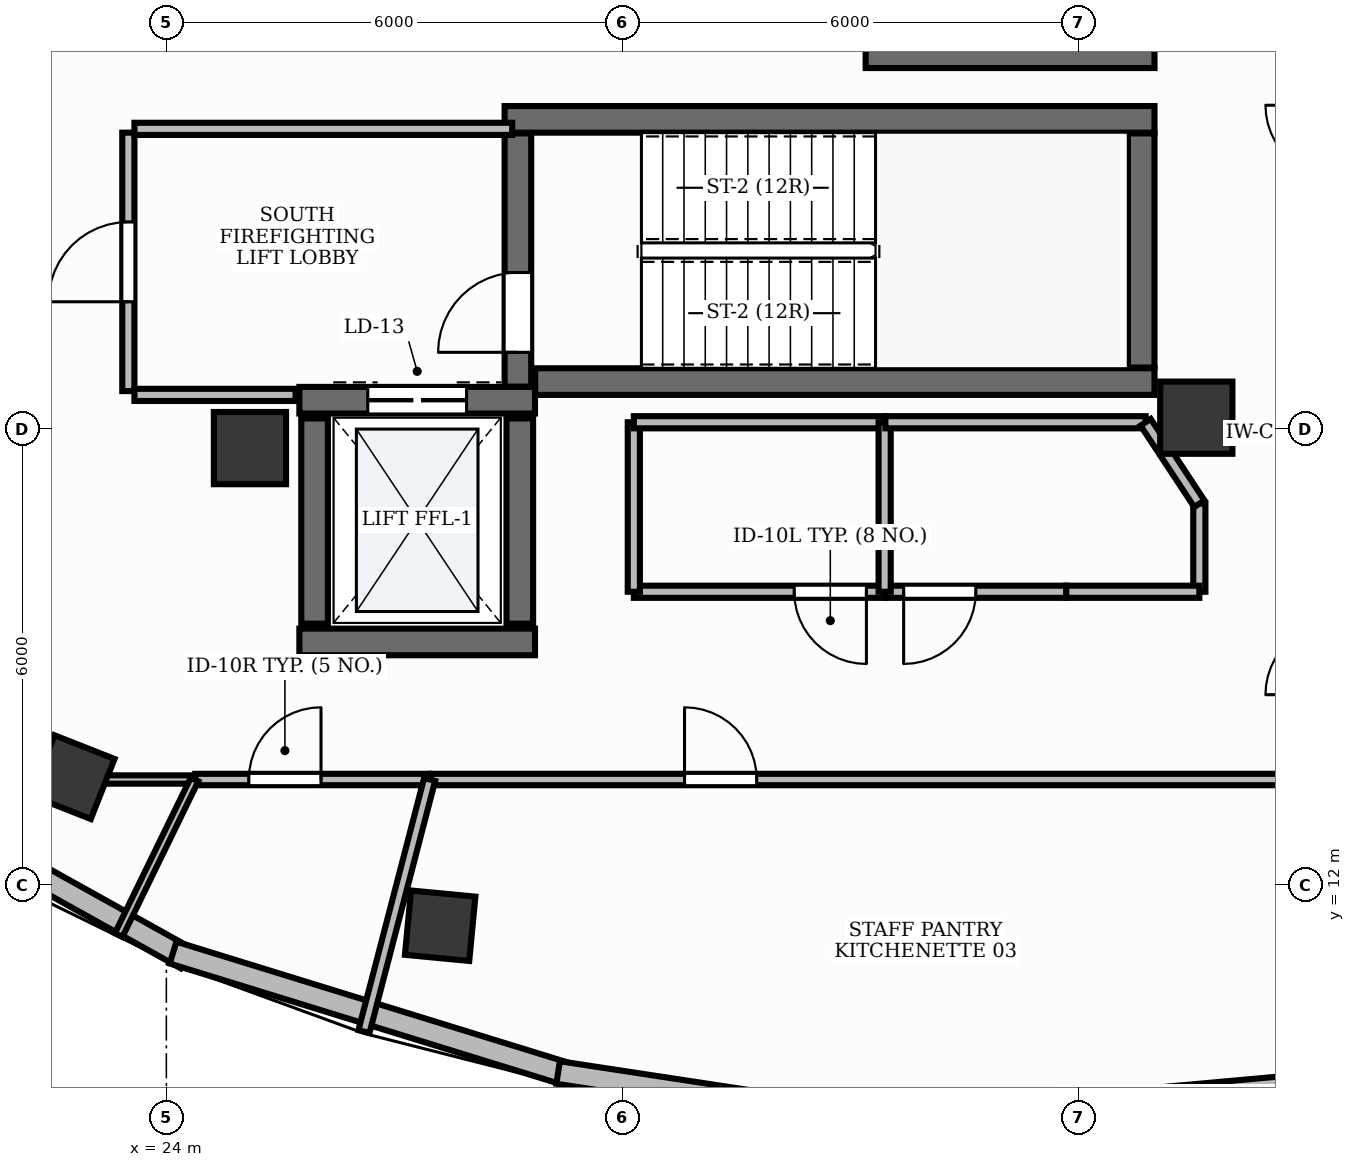
"""IFC4 building model, lengths in metres.
Left out: names, types, materials, properties, quantities, classifications, styles, units other than length and angle.
Written with IfcOpenShell. Run it as: python <this file> out.ifc"""

import sys

from ifc_helpers import new_model, si_unit, direction, frame, frame_2d, origin, origin_2d, place, context, subcontext, project, spatial, rectangle, extrude, element, fill, save


model = new_model("IFC4")
c1 = context("Model", 3, precision=1e-05, world=origin(), true_north=direction((0.0, 1.0)))
c2 = subcontext(c1, "Body", "Model", "MODEL_VIEW")
j1 = project(units=[si_unit("LENGTHUNIT", "METRE"), si_unit("PLANEANGLEUNIT", "RADIAN")], contexts=[c1])
p1 = place(None, origin())
s1 = spatial("IfcSite", under=j1, at=p1, CompositionType="ELEMENT")
p2 = place(p1, origin())
s2 = spatial("IfcBuilding", under=s1, at=p2, CompositionType="ELEMENT")
p3 = place(p2, frame((0.0, 0.0, 306.0)))
s3 = spatial("IfcBuildingStorey", under=s2, at=p3, CompositionType="ELEMENT", Elevation=306.0)
p4 = place(p3, frame((28.852, 18.625, 0.0), z_axis=(0.0, 0.0, 1.0), x_axis=(1.0, 0.0, 0.0)))
e1 = element("IfcWall", 1, at=p4, inside=s3, PredefinedType="SHEAR", context=c2, shape_type="SweptSolid", body=[
    extrude(rectangle(XDim=8.148, YDim=0.35, at=frame_2d((4.074, 0.0))), origin(), (0.0, 0.0, 1.0), 3.9),
])
p5 = place(p3, frame((28.45, 22.075, 0.0), z_axis=(0.0, 0.0, 1.0), x_axis=(1.0, 0.0, 0.0)))
e2 = element("IfcWall", 2, at=p5, inside=s3, PredefinedType="SHEAR", context=c2, shape_type="SweptSolid", body=[
    extrude(rectangle(XDim=8.55, YDim=0.35, at=frame_2d((4.275, 0.0))), origin(), (0.0, 0.0, 1.0), 3.9),
])
p6 = place(p3, frame((36.825, 18.81, 0.0), z_axis=(0.0, 0.0, 1.0), x_axis=(0.0, 1.0, 0.0)))
e3 = element("IfcWall", 3, at=p6, inside=s3, PredefinedType="SHEAR", context=c2, shape_type="SweptSolid", body=[
    extrude(rectangle(XDim=3.08, YDim=0.35, at=frame_2d((1.54, 0.0))), origin(), (0.0, 0.0, 1.0), 3.9),
])
p7 = place(p3, frame((28.625, 18.557, 0.0), z_axis=(0.0, 0.0, 1.0), x_axis=(0.0, 1.0, 0.0)))
e4 = element("IfcWall", 4, at=p7, inside=s3, PredefinedType="SHEAR", context=c2, shape_type="SweptSolid", body=[
    extrude(rectangle(XDim=3.333, YDim=0.35, at=frame_2d((1.667, 0.0))), origin(), (0.0, 0.0, 1.0), 3.9),
])
p8 = place(p7, frame((0.453, 0.0, 0.0)))
e5 = element("IfcOpeningElement", 5, at=p8, cuts=e4, PredefinedType="OPENING", context=c2, shape_type="SweptSolid", body=[
    extrude(rectangle(XDim=1.05, YDim=2.15, at=frame_2d((0.525, 1.075))), frame((0.0, 0.19, 0.0), z_axis=(0.0, -1.0, 0.0), x_axis=(1.0, 0.0, 0.0)), (0.0, 0.0, 1.0), 0.38),
])
p9 = place(p3, frame((33.2, 22.925, 0.0), z_axis=(0.0, 0.0, 1.0), x_axis=(1.0, 0.0, 0.0)))
e6 = element("IfcWall", 6, at=p9, inside=s3, PredefinedType="SHEAR", context=c2, shape_type="SweptSolid", body=[
    extrude(rectangle(XDim=3.8, YDim=0.35, at=frame_2d((1.9, 0.0))), origin(), (0.0, 0.0, 1.0), 3.9),
])
p10 = place(p3, frame((25.75, 15.2, 0.0), z_axis=(0.0, 0.0, 1.0), x_axis=(1.0, 0.0, 0.0)))
e7 = element("IfcWall", 7, at=p10, inside=s3, PredefinedType="SHEAR", context=c2, shape_type="SweptSolid", body=[
    extrude(rectangle(XDim=3.1, YDim=0.35, at=frame_2d((1.55, 0.0))), origin(), (0.0, 0.0, 1.0), 3.9),
])
p11 = place(p3, frame((25.75, 18.38, 0.0), z_axis=(0.0, 0.0, 1.0), x_axis=(1.0, 0.0, 0.0)))
e8 = element("IfcWall", 8, at=p11, inside=s3, PredefinedType="SHEAR", context=c2, shape_type="SweptSolid", body=[
    extrude(rectangle(XDim=3.1, YDim=0.35, at=frame_2d((1.55, 0.0))), origin(), (0.0, 0.0, 1.0), 3.9),
])
p12 = place(p11, frame((0.9, 0.0, 0.0)))
e9 = element("IfcOpeningElement", 9, at=p12, cuts=e8, PredefinedType="OPENING", context=c2, shape_type="SweptSolid", body=[
    extrude(rectangle(XDim=1.3, YDim=2.2, at=frame_2d((0.65, 1.1))), frame((0.0, 0.19, 0.0), z_axis=(0.0, -1.0, 0.0), x_axis=(1.0, 0.0, 0.0)), (0.0, 0.0, 1.0), 0.38),
])
for number, where, z_axis, x_axis in (
    (10, (25.95, 15.44, 0.0), (0.0, 0.0, 1.0), (0.0, 1.0, 0.0)),
    (11, (28.65, 15.44, 0.0), (0.0, 0.0, 1.0), (0.0, 1.0, 0.0)),
):
    element("IfcWall", number, at=place(p3, frame(where, z_axis=z_axis, x_axis=x_axis)), inside=s3, PredefinedType="SHEAR", context=c2, shape_type="SweptSolid", body=[
        extrude(rectangle(XDim=2.7, YDim=0.35, at=frame_2d((1.35, 0.0))), origin(), (0.0, 0.0, 1.0), 3.9),
    ])
for number, where, z_axis, x_axis in (
    (12, (25.1, 17.75, -0.0), (0.0, 0.0, 1.0), (1.0, 0.0, 0.0)),
    (13, (37.55, 18.15, -0.0), (0.0, 0.0, 1.0), (1.0, 0.0, 0.0)),
):
    element("IfcColumn", number, at=place(p3, frame(where, z_axis=z_axis, x_axis=x_axis)), inside=s3, PredefinedType="PILASTER", context=c2, shape_type="SweptSolid", body=[
        extrude(rectangle(XDim=0.95, YDim=0.95, at=origin_2d()), origin(), (0.0, 0.0, 1.0), 3.901),
    ])
for number, where, z_axis, x_axis in (
    (14, (22.766, 13.421, -0.0), (0.0, 0.0, 1.0), (-0.93, 0.367, 0.0)),
    (15, (27.602, 11.466, -0.0), (0.0, 0.0, 1.0), (-0.995, 0.095, 0.0)),
):
    element("IfcColumn", number, at=place(p3, frame(where, z_axis=z_axis, x_axis=x_axis)), inside=s3, PredefinedType="COLUMN", context=c2, shape_type="SweptSolid", body=[
        extrude(rectangle(XDim=0.85, YDim=0.85, at=origin_2d()), origin(), (0.0, 0.0, 1.0), 3.901),
    ])
p13 = place(p3, frame((19.648, 13.61, 0.0), z_axis=(0.0, 0.0, 1.0), x_axis=(0.87350676692, -0.486812004932, 0.0)))
e16 = element("IfcWall", 16, at=p13, inside=s3, PredefinedType="STANDARD", context=c2, shape_type="SweptSolid", body=[
    extrude(rectangle(XDim=5.282, YDim=0.3, at=frame_2d((2.641, 0.0))), origin(), (0.0, 0.0, 1.0), 3.9),
])
p14 = place(p3, frame((24.088, 11.113, 0.0), z_axis=(0.0, 0.0, 1.0), x_axis=(0.955535200816, -0.29487705913, 0.0)))
e17 = element("IfcWall", 17, at=p14, inside=s3, PredefinedType="STANDARD", context=c2, shape_type="SweptSolid", body=[
    extrude(rectangle(XDim=5.485, YDim=0.3, at=frame_2d((2.743, 0.0))), origin(), (0.0, 0.0, 1.0), 3.9),
])
p15 = place(p3, frame((29.154, 9.535, 0.0), z_axis=(0.0, 0.0, 1.0), x_axis=(0.988626523862, -0.150391476873, 0.0)))
e18 = element("IfcWall", 18, at=p15, inside=s3, PredefinedType="STANDARD", context=c2, shape_type="SweptSolid", body=[
    extrude(rectangle(XDim=2.875, YDim=0.3, at=frame_2d((1.438, 0.0))), origin(), (0.0, 0.0, 1.0), 3.9),
])
p16 = place(p3, frame((34.529, 8.961, 0.0), z_axis=(0.0, 0.0, 1.0), x_axis=(0.995950163058, 0.089907022552, 0.0)))
e19 = element("IfcWall", 19, at=p16, inside=s3, PredefinedType="STANDARD", context=c2, shape_type="SweptSolid", body=[
    extrude(rectangle(XDim=5.602, YDim=0.3, at=frame_2d((2.801, 0.0))), origin(), (0.0, 0.0, 1.0), 3.9),
])
p17 = place(p3, frame((23.5, 18.5, 0.0), z_axis=(0.0, 0.0, 1.0), x_axis=(0.0, 1.0, 0.0)))
e20 = element("IfcWall", 20, at=p17, inside=s3, PredefinedType="PARTITIONING", context=c2, shape_type="SweptSolid", body=[
    extrude(rectangle(XDim=3.4, YDim=0.16, at=frame_2d((1.7, 0.0))), origin(), (0.0, 0.0, 1.0), 2.91),
])
p18 = place(p17, frame((1.175, 0.0, 0.0)))
e21 = element("IfcOpeningElement", 21, at=p18, cuts=e20, PredefinedType="OPENING", context=c2, shape_type="SweptSolid", body=[
    extrude(rectangle(XDim=1.05, YDim=2.15, at=frame_2d((0.525, 1.075))), frame((0.0, 0.095, 0.0), z_axis=(0.0, -1.0, 0.0), x_axis=(1.0, 0.0, 0.0)), (0.0, 0.0, 1.0), 0.19),
])
p19 = place(p3, frame((23.58, 21.95, 0.0), z_axis=(0.0, 0.0, 1.0), x_axis=(1.0, 0.0, 0.0)))
e22 = element("IfcWall", 22, at=p19, inside=s3, PredefinedType="PARTITIONING", context=c2, shape_type="SweptSolid", body=[
    extrude(rectangle(XDim=4.97, YDim=0.16, at=frame_2d((2.485, 0.0))), origin(), (0.0, 0.0, 1.0), 2.91),
])
p20 = place(p3, frame((23.58, 18.45, 0.0), z_axis=(0.0, 0.0, 1.0), x_axis=(1.0, 0.0, 0.0)))
e23 = element("IfcWall", 23, at=p20, inside=s3, PredefinedType="PARTITIONING", context=c2, shape_type="SweptSolid", body=[
    extrude(rectangle(XDim=2.12, YDim=0.16, at=frame_2d((1.06, 0.0))), origin(), (0.0, 0.0, 1.0), 2.91),
])
p21 = place(p3, frame((33.45, 15.86, 0.0), z_axis=(0.0, 0.0, 1.0), x_axis=(-1.0, 0.0, 0.0)))
e24 = element("IfcWall", 24, at=p21, inside=s3, PredefinedType="PARTITIONING", context=c2, shape_type="SweptSolid", body=[
    extrude(rectangle(XDim=3.3, YDim=0.16, at=frame_2d((1.65, 0.0))), origin(), (0.0, 0.0, 1.0), 2.91),
])
p22 = place(p21, frame((0.24, 0.0, 0.0)))
e25 = element("IfcOpeningElement", 25, at=p22, cuts=e24, PredefinedType="OPENING", context=c2, shape_type="SweptSolid", body=[
    extrude(rectangle(XDim=0.95, YDim=2.15, at=frame_2d((0.475, 1.075))), frame((0.0, 0.095, 0.0), z_axis=(0.0, -1.0, 0.0), x_axis=(1.0, 0.0, 0.0)), (0.0, 0.0, 1.0), 0.19),
])
p23 = place(p3, frame((24.381, 13.39, 0.0), z_axis=(0.0, 0.0, 1.0), x_axis=(1.0, 0.0, 0.0)))
e26 = element("IfcWall", 26, at=p23, inside=s3, PredefinedType="PARTITIONING", context=c2, shape_type="SweptSolid", body=[
    extrude(rectangle(XDim=3.083, YDim=0.15, at=frame_2d((1.542, 0.0))), origin(), (0.0, 0.0, 1.0), 2.91),
])
p24 = place(p23, frame((0.704, 0.0, 0.0)))
e27 = element("IfcOpeningElement", 27, at=p24, cuts=e26, PredefinedType="OPENING", context=c2, shape_type="SweptSolid", body=[
    extrude(rectangle(XDim=0.95, YDim=2.15, at=frame_2d((0.475, 1.075))), frame((0.0, 0.09, 0.0), z_axis=(0.0, -1.0, 0.0), x_axis=(1.0, 0.0, 0.0)), (0.0, 0.0, 1.0), 0.18),
])
p25 = place(p3, frame((27.474, 13.39, 0.0), z_axis=(0.0, 0.0, 1.0), x_axis=(1.0, 0.0, 0.0)))
e28 = element("IfcWall", 28, at=p25, inside=s3, PredefinedType="PARTITIONING", context=c2, shape_type="SweptSolid", body=[
    extrude(rectangle(XDim=11.926, YDim=0.15, at=frame_2d((5.963, 0.0))), origin(), (0.0, 0.0, 1.0), 2.91),
])
p26 = place(p25, frame((3.344, 0.0, 0.0)))
e29 = element("IfcOpeningElement", 29, at=p26, cuts=e28, PredefinedType="OPENING", context=c2, shape_type="SweptSolid", body=[
    extrude(rectangle(XDim=0.95, YDim=2.15, at=frame_2d((0.475, 1.075))), frame((0.0, 0.09, 0.0), z_axis=(0.0, -1.0, 0.0), x_axis=(1.0, 0.0, 0.0)), (0.0, 0.0, 1.0), 0.18),
])
p27 = place(p3, frame((35.84, 15.86, 0.0), z_axis=(0.0, 0.0, 1.0), x_axis=(-1.0, 0.0, 0.0)))
e30 = element("IfcWall", 30, at=p27, inside=s3, PredefinedType="PARTITIONING", context=c2, shape_type="SweptSolid", body=[
    extrude(rectangle(XDim=2.38, YDim=0.16, at=frame_2d((1.19, 0.0))), origin(), (0.0, 0.0, 1.0), 2.91),
])
p28 = place(p27, frame((1.19, 0.0, 0.0)))
e31 = element("IfcOpeningElement", 31, at=p28, cuts=e30, PredefinedType="OPENING", context=c2, shape_type="SweptSolid", body=[
    extrude(rectangle(XDim=0.95, YDim=2.15, at=frame_2d((0.475, 1.075))), frame((0.0, 0.095, 0.0), z_axis=(0.0, -1.0, 0.0), x_axis=(1.0, 0.0, 0.0)), (0.0, 0.0, 1.0), 0.19),
])
p29 = place(p3, frame((30.15, 15.86, 0.0), z_axis=(0.0, 0.0, 1.0), x_axis=(0.0, 1.0, 0.0)))
e32 = element("IfcWall", 32, at=p29, inside=s3, PredefinedType="PARTITIONING", context=c2, shape_type="SweptSolid", body=[
    extrude(rectangle(XDim=2.23, YDim=0.16, at=frame_2d((1.115, 0.0))), origin(), (0.0, 0.0, 1.0), 2.91),
])
p30 = place(p3, frame((30.15, 18.09, 0.0), z_axis=(0.0, 0.0, 1.0), x_axis=(1.0, 0.0, 0.0)))
e33 = element("IfcWall", 33, at=p30, inside=s3, PredefinedType="PARTITIONING", context=c2, shape_type="SweptSolid", body=[
    extrude(rectangle(XDim=3.3, YDim=0.16, at=frame_2d((1.65, 0.0))), origin(), (0.0, 0.0, 1.0), 2.91),
])
p31 = place(p3, frame((33.45, 18.09, 0.0), z_axis=(0.0, 0.0, 1.0), x_axis=(0.0, -1.0, 0.0)))
e34 = element("IfcWall", 34, at=p31, inside=s3, PredefinedType="PARTITIONING", context=c2, shape_type="SweptSolid", body=[
    extrude(rectangle(XDim=2.23, YDim=0.16, at=frame_2d((1.115, 0.0))), origin(), (0.0, 0.0, 1.0), 2.91),
])
p32 = place(p3, frame((21.8, 13.39, 0.0), z_axis=(0.0, 0.0, 1.0), x_axis=(1.0, 0.0, 0.0)))
e35 = element("IfcWall", 35, at=p32, inside=s3, PredefinedType="MOVABLE", context=c2, shape_type="SweptSolid", body=[
    extrude(rectangle(XDim=2.571, YDim=0.11, at=frame_2d((1.285, 0.0))), origin(), (0.0, 0.0, 1.0), 2.91),
])
p33 = place(p3, frame((24.371, 13.39, 0.0), z_axis=(0.0, 0.0, 1.0), x_axis=(-0.438396158112, -0.898781847031, 0.0)))
e36 = element("IfcWall", 36, at=p33, inside=s3, PredefinedType="MOVABLE", context=c2, shape_type="SweptSolid", body=[
    extrude(rectangle(XDim=2.276, YDim=0.11, at=frame_2d((1.138, 0.0))), origin(), (0.0, 0.0, 1.0), 2.91),
])
p34 = place(p3, frame((27.464, 13.39, 0.0), z_axis=(0.0, 0.0, 1.0), x_axis=(-0.252111588714, -0.967698169284, 0.0)))
e37 = element("IfcWall", 37, at=p34, inside=s3, PredefinedType="PARTITIONING", context=c2, shape_type="SweptSolid", body=[
    extrude(rectangle(XDim=3.427, YDim=0.15, at=frame_2d((1.713, 0.0))), origin(), (0.0, 0.0, 1.0), 2.91),
])
p35 = place(p3, frame((37.59, 17.019, 0.0), z_axis=(0.0, 0.0, 1.0), x_axis=(0.0, -1.0, 0.0)))
e38 = element("IfcWall", 38, at=p35, inside=s3, PredefinedType="PARTITIONING", context=c2, shape_type="SweptSolid", body=[
    extrude(rectangle(XDim=1.158, YDim=0.16, at=frame_2d((0.579, 0.0))), origin(), (0.0, 0.0, 1.0), 2.91),
])
p36 = place(p3, frame((37.59, 15.86, 0.0), z_axis=(0.0, 0.0, 1.0), x_axis=(-1.0, 0.0, 0.0)))
e39 = element("IfcWall", 39, at=p36, inside=s3, PredefinedType="PARTITIONING", context=c2, shape_type="SweptSolid", body=[
    extrude(rectangle(XDim=1.75, YDim=0.16, at=frame_2d((0.875, 0.0))), origin(), (0.0, 0.0, 1.0), 2.91),
])
p37 = place(p3, frame((33.46, 18.09, 0.0), z_axis=(0.0, 0.0, 1.0), x_axis=(1.0, 0.0, 0.0)))
e40 = element("IfcWall", 40, at=p37, inside=s3, PredefinedType="PARTITIONING", context=c2, shape_type="SweptSolid", body=[
    extrude(rectangle(XDim=3.424, YDim=0.16, at=frame_2d((1.712, 0.0))), origin(), (0.0, 0.0, 1.0), 2.91),
])
p38 = place(p3, frame((36.884, 18.09, 0.0), z_axis=(0.0, 0.0, 1.0), x_axis=(0.550479112078, -0.834848936734, 0.0)))
e41 = element("IfcWall", 41, at=p38, inside=s3, PredefinedType="PARTITIONING", context=c2, shape_type="SweptSolid", body=[
    extrude(rectangle(XDim=1.283, YDim=0.16, at=frame_2d((0.642, 0.0))), origin(), (0.0, 0.0, 1.0), 2.91),
])
p39 = place(p8, origin())
e42 = element("IfcDoor", 42, at=p39, inside=s3, OperationType="SINGLE_SWING_LEFT", PredefinedType="DOOR", context=c2, shape_type="SweptSolid", body=[
    extrude(rectangle(XDim=1.05, YDim=2.15, at=frame_2d((0.525, 1.075))), frame((0.0, 0.025, 0.0), z_axis=(0.0, -1.0, 0.0), x_axis=(1.0, 0.0, 0.0)), (0.0, 0.0, 1.0), 0.05),
])
fill(e5, e42)
p40 = place(p12, origin())
e43 = element("IfcDoor", 43, at=p40, inside=s3, OperationType="DOUBLE_DOOR_SLIDING", PredefinedType="DOOR", context=c2, shape_type="SweptSolid", body=[
    extrude(rectangle(XDim=1.3, YDim=2.2, at=frame_2d((0.65, 1.1))), frame((0.0, 0.025, 0.0), z_axis=(0.0, -1.0, 0.0), x_axis=(1.0, 0.0, 0.0)), (0.0, 0.0, 1.0), 0.05),
])
fill(e9, e43)
p41 = place(p18, origin())
e44 = element("IfcDoor", 44, at=p41, inside=s3, OperationType="SINGLE_SWING_LEFT", PredefinedType="DOOR", context=c2, shape_type="SweptSolid", body=[
    extrude(rectangle(XDim=1.05, YDim=2.15, at=frame_2d((0.525, 1.075))), frame((0.0, 0.025, 0.0), z_axis=(0.0, -1.0, 0.0), x_axis=(1.0, 0.0, 0.0)), (0.0, 0.0, 1.0), 0.05),
])
fill(e21, e44)
p42 = place(p22, origin())
e45 = element("IfcDoor", 45, at=p42, inside=s3, OperationType="SINGLE_SWING_LEFT", PredefinedType="DOOR", context=c2, shape_type="SweptSolid", body=[
    extrude(rectangle(XDim=0.95, YDim=2.15, at=frame_2d((0.475, 1.075))), frame((0.0, 0.025, 0.0), z_axis=(0.0, -1.0, 0.0), x_axis=(1.0, 0.0, 0.0)), (0.0, 0.0, 1.0), 0.05),
])
fill(e25, e45)
p43 = place(p24, origin())
e46 = element("IfcDoor", 46, at=p43, inside=s3, OperationType="SINGLE_SWING_RIGHT", PredefinedType="DOOR", context=c2, shape_type="SweptSolid", body=[
    extrude(rectangle(XDim=0.95, YDim=2.15, at=frame_2d((0.475, 1.075))), frame((0.0, 0.025, 0.0), z_axis=(0.0, -1.0, 0.0), x_axis=(1.0, 0.0, 0.0)), (0.0, 0.0, 1.0), 0.05),
])
fill(e27, e46)
p44 = place(p26, origin())
e47 = element("IfcDoor", 47, at=p44, inside=s3, OperationType="SINGLE_SWING_LEFT", PredefinedType="DOOR", context=c2, shape_type="SweptSolid", body=[
    extrude(rectangle(XDim=0.95, YDim=2.15, at=frame_2d((0.475, 1.075))), frame((0.0, 0.025, 0.0), z_axis=(0.0, -1.0, 0.0), x_axis=(1.0, 0.0, 0.0)), (0.0, 0.0, 1.0), 0.05),
])
fill(e29, e47)
p45 = place(p28, origin())
e48 = element("IfcDoor", 48, at=p45, inside=s3, OperationType="SINGLE_SWING_RIGHT", PredefinedType="DOOR", context=c2, shape_type="SweptSolid", body=[
    extrude(rectangle(XDim=0.95, YDim=2.15, at=frame_2d((0.475, 1.075))), frame((0.0, 0.025, 0.0), z_axis=(0.0, -1.0, 0.0), x_axis=(1.0, 0.0, 0.0)), (0.0, 0.0, 1.0), 0.05),
])
fill(e31, e48)
save(model, sys.argv[1])
